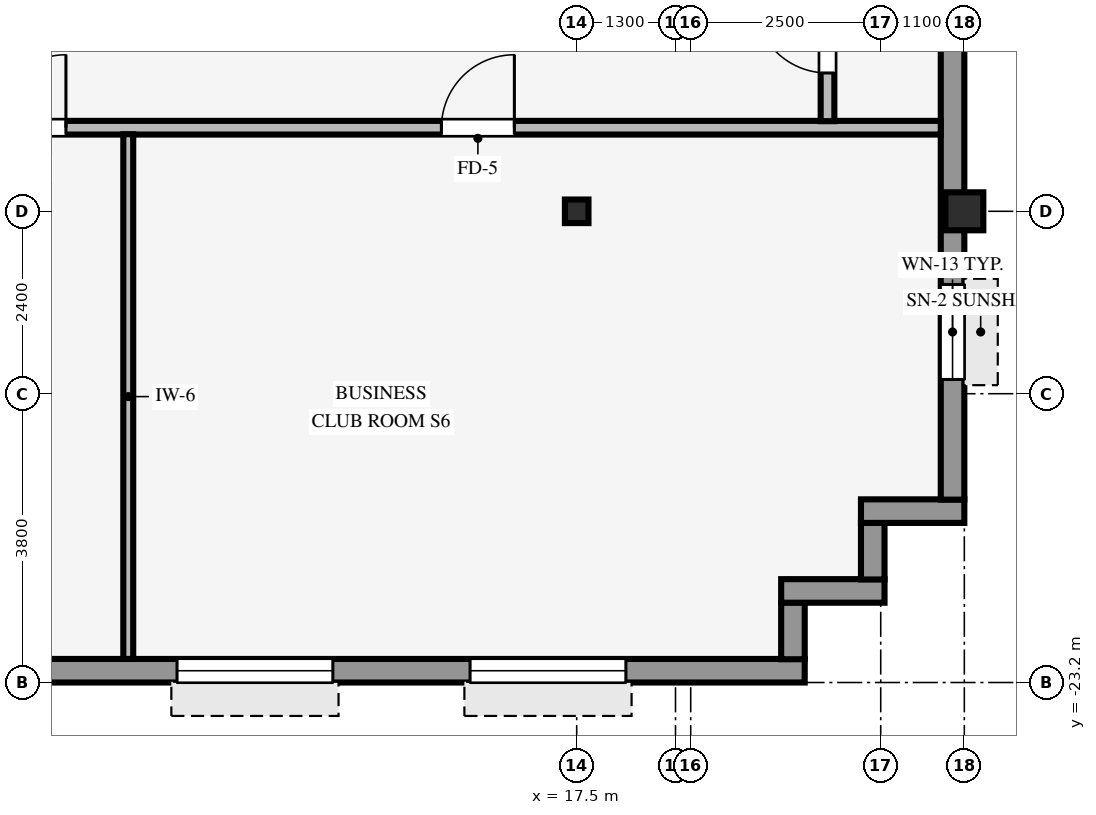
"""IFC4 building model, lengths in metres.
Left out: names, types, materials, properties, quantities, classifications, styles, units other than length and angle.
Written with IfcOpenShell. Run it as: python <this file> out.ifc"""

import sys

from ifc_helpers import new_model, si_unit, direction, frame, frame_2d, origin, origin_2d, place, context, subcontext, project, spatial, rectangle, hollow_rectangle, i_section, extrude, source, transform, mapped, element, fill, save


model = new_model("IFC4")
c1 = context("Model", 3, precision=1e-05, world=origin(), true_north=direction((0.0, 1.0)))
c2 = subcontext(c1, "Body", "Model", "MODEL_VIEW")
j1 = project(units=[si_unit("LENGTHUNIT", "METRE"), si_unit("PLANEANGLEUNIT", "RADIAN")], contexts=[c1])
p1 = place(None, origin())
s1 = spatial("IfcSite", under=j1, at=p1, CompositionType="ELEMENT")
p2 = place(p1, origin())
s2 = spatial("IfcBuilding", under=s1, at=p2, CompositionType="ELEMENT")
p3 = place(p2, frame((0.0, 0.0, 194.55)))
s3 = spatial("IfcBuildingStorey", under=s2, at=p3, CompositionType="ELEMENT", Elevation=194.55)
p4 = place(p3, frame((22.6, -17.0, 0.0), z_axis=(0.0, 0.0, 1.0), x_axis=(1.0, 0.0, 0.0)))
e1 = element("IfcColumn", 1, at=p4, inside=s3, PredefinedType="COLUMN", context=c2, shape_type="SweptSolid", body=[
    extrude(hollow_rectangle(XDim=0.5, YDim=0.5, WallThickness=0.032, InnerFilletRadius=0.032, OuterFilletRadius=0.064, at=origin_2d()), origin(), (0.0, 0.0, 1.0), 3.37),
])
p5 = place(p3, frame((17.5, -17.0, 0.0), z_axis=(0.0, 0.0, 1.0), x_axis=(1.0, 0.0, 0.0)))
e2 = element("IfcColumn", 2, at=p5, inside=s3, PredefinedType="COLUMN", context=c2, shape_type="SweptSolid", body=[
    extrude(i_section(OverallWidth=0.31, OverallDepth=0.31, WebThickness=0.015, FlangeThickness=0.015, FilletRadius=0.015, at=origin_2d()), origin(), (0.0, 0.0, 1.0), 3.37),
])
p6 = place(p3, frame((-24.3, -23.045, 0.0), z_axis=(0.0, 0.0, 1.0), x_axis=(1.0, 0.0, 0.0)))
e3 = element("IfcWall", 3, at=p6, inside=s3, PredefinedType="STANDARD", context=c2, shape_type="SweptSolid", body=[
    extrude(rectangle(XDim=44.8, YDim=0.31, at=frame_2d((22.4, 0.0))), origin(), (0.0, 0.0, 1.0), 2.705),
])
p7 = place(p6, frame((2.353, 0.0, 0.8)))
e4 = element("IfcOpeningElement", 4, at=p7, cuts=e3, PredefinedType="OPENING", context=c2, shape_type="SweptSolid", body=[
    extrude(rectangle(XDim=2.05, YDim=1.52, at=frame_2d((1.025, 0.76))), frame((0.0, 0.165, 0.0), z_axis=(0.0, -1.0, 0.0), x_axis=(1.0, 0.0, 0.0)), (0.0, 0.0, 1.0), 0.33),
])
p8 = place(p6, frame((7.108, 0.0, 0.8)))
e5 = element("IfcOpeningElement", 5, at=p8, cuts=e3, PredefinedType="OPENING", context=c2, shape_type="SweptSolid", body=[
    extrude(rectangle(XDim=2.05, YDim=1.52, at=frame_2d((1.025, 0.76))), frame((0.0, 0.165, 0.0), z_axis=(0.0, -1.0, 0.0), x_axis=(1.0, 0.0, 0.0)), (0.0, 0.0, 1.0), 0.33),
])
p9 = place(p6, frame((16.619, 0.0, 0.8)))
e6 = element("IfcOpeningElement", 6, at=p9, cuts=e3, PredefinedType="OPENING", context=c2, shape_type="SweptSolid", body=[
    extrude(rectangle(XDim=2.05, YDim=1.52, at=frame_2d((1.025, 0.76))), frame((0.0, 0.165, 0.0), z_axis=(0.0, -1.0, 0.0), x_axis=(1.0, 0.0, 0.0)), (0.0, 0.0, 1.0), 0.33),
])
p10 = place(p6, frame((21.375, 0.0, 0.8)))
e7 = element("IfcOpeningElement", 7, at=p10, cuts=e3, PredefinedType="OPENING", context=c2, shape_type="SweptSolid", body=[
    extrude(rectangle(XDim=2.05, YDim=1.52, at=frame_2d((1.025, 0.76))), frame((0.0, 0.165, 0.0), z_axis=(0.0, -1.0, 0.0), x_axis=(1.0, 0.0, 0.0)), (0.0, 0.0, 1.0), 0.33),
])
p11 = place(p6, frame((26.131, 0.0, 0.8)))
e8 = element("IfcOpeningElement", 8, at=p11, cuts=e3, PredefinedType="OPENING", context=c2, shape_type="SweptSolid", body=[
    extrude(rectangle(XDim=2.05, YDim=1.52, at=frame_2d((1.025, 0.76))), frame((0.0, 0.165, 0.0), z_axis=(0.0, -1.0, 0.0), x_axis=(1.0, 0.0, 0.0)), (0.0, 0.0, 1.0), 0.33),
])
p12 = place(p6, frame((30.436, 0.0, 0.8)))
e9 = element("IfcOpeningElement", 9, at=p12, cuts=e3, PredefinedType="OPENING", context=c2, shape_type="SweptSolid", body=[
    extrude(rectangle(XDim=2.05, YDim=1.52, at=frame_2d((1.025, 0.76))), frame((0.0, 0.165, 0.0), z_axis=(0.0, -1.0, 0.0), x_axis=(1.0, 0.0, 0.0)), (0.0, 0.0, 1.0), 0.33),
])
p13 = place(p6, frame((36.542, 0.0, 0.8)))
e10 = element("IfcOpeningElement", 10, at=p13, cuts=e3, PredefinedType="OPENING", context=c2, shape_type="SweptSolid", body=[
    extrude(rectangle(XDim=2.05, YDim=1.52, at=frame_2d((1.025, 0.76))), frame((0.0, 0.165, 0.0), z_axis=(0.0, -1.0, 0.0), x_axis=(1.0, 0.0, 0.0)), (0.0, 0.0, 1.0), 0.33),
])
p14 = place(p6, frame((40.397, 0.0, 0.8)))
e11 = element("IfcOpeningElement", 11, at=p14, cuts=e3, PredefinedType="OPENING", context=c2, shape_type="SweptSolid", body=[
    extrude(rectangle(XDim=2.05, YDim=1.52, at=frame_2d((1.025, 0.76))), frame((0.0, 0.165, 0.0), z_axis=(0.0, -1.0, 0.0), x_axis=(1.0, 0.0, 0.0)), (0.0, 0.0, 1.0), 0.33),
])
p15 = place(p3, frame((20.345, -22.894, 0.0), z_axis=(0.0, 0.0, 1.0), x_axis=(0.0, 1.0, 0.0)))
e12 = element("IfcWall", 12, at=p15, inside=s3, PredefinedType="STANDARD", context=c2, shape_type="SweptSolid", body=[
    extrude(rectangle(XDim=0.748, YDim=0.31, at=frame_2d((0.374, 0.0))), origin(), (0.0, 0.0, 1.0), 3.36),
])
p16 = place(p3, frame((20.19, -21.995, 0.0), z_axis=(0.0, 0.0, 1.0), x_axis=(1.0, 0.0, 0.0)))
e13 = element("IfcWall", 13, at=p16, inside=s3, PredefinedType="STANDARD", context=c2, shape_type="SweptSolid", body=[
    extrude(rectangle(XDim=1.36, YDim=0.31, at=frame_2d((0.68, 0.0))), origin(), (0.0, 0.0, 1.0), 3.36),
])
p17 = place(p3, frame((21.395, -21.844, 0.0), z_axis=(0.0, 0.0, 1.0), x_axis=(0.0, 1.0, 0.0)))
e14 = element("IfcWall", 14, at=p17, inside=s3, PredefinedType="STANDARD", context=c2, shape_type="SweptSolid", body=[
    extrude(rectangle(XDim=0.748, YDim=0.31, at=frame_2d((0.374, 0.0))), origin(), (0.0, 0.0, 1.0), 3.36),
])
p18 = place(p3, frame((21.24, -20.945, 0.0), z_axis=(0.0, 0.0, 1.0), x_axis=(1.0, 0.0, 0.0)))
e15 = element("IfcWall", 15, at=p18, inside=s3, PredefinedType="STANDARD", context=c2, shape_type="SweptSolid", body=[
    extrude(rectangle(XDim=1.36, YDim=0.31, at=frame_2d((0.68, 0.0))), origin(), (0.0, 0.0, 1.0), 3.36),
])
p19 = place(p3, frame((22.445, -20.794, 0.0), z_axis=(0.0, 0.0, 1.0), x_axis=(0.0, 1.0, 0.0)))
e16 = element("IfcWall", 16, at=p19, inside=s3, PredefinedType="STANDARD", context=c2, shape_type="SweptSolid", body=[
    extrude(rectangle(XDim=37.788, YDim=0.31, at=frame_2d((18.894, 0.0))), origin(), (0.0, 0.0, 1.0), 2.705),
])
p20 = place(p19, frame((16.474, 0.0, 0.0), z_axis=(0.0, 0.0, 1.0), x_axis=(-1.0, 0.0, 0.0)))
e17 = element("IfcOpeningElement", 17, at=p20, cuts=e16, PredefinedType="OPENING", context=c2, shape_type="SweptSolid", body=[
    extrude(rectangle(XDim=0.98, YDim=2.15, at=frame_2d((0.49, 1.075))), frame((0.0, 0.165, 0.0), z_axis=(0.0, -1.0, 0.0), x_axis=(1.0, 0.0, 0.0)), (0.0, 0.0, 1.0), 0.33),
])
p21 = place(p19, frame((1.581, 0.0, 0.8)))
e18 = element("IfcOpeningElement", 18, at=p21, cuts=e16, PredefinedType="OPENING", context=c2, shape_type="SweptSolid", body=[
    extrude(rectangle(XDim=1.25, YDim=1.52, at=frame_2d((0.625, 0.76))), frame((0.0, 0.165, 0.0), z_axis=(0.0, -1.0, 0.0), x_axis=(1.0, 0.0, 0.0)), (0.0, 0.0, 1.0), 0.33),
])
p22 = place(p19, frame((8.044, 0.0, 0.8)))
e19 = element("IfcOpeningElement", 19, at=p22, cuts=e16, PredefinedType="OPENING", context=c2, shape_type="SweptSolid", body=[
    extrude(rectangle(XDim=1.25, YDim=1.52, at=frame_2d((0.625, 0.76))), frame((0.0, 0.165, 0.0), z_axis=(0.0, -1.0, 0.0), x_axis=(1.0, 0.0, 0.0)), (0.0, 0.0, 1.0), 0.33),
])
p23 = place(p19, frame((13.156, 0.0, 0.8)))
e20 = element("IfcOpeningElement", 20, at=p23, cuts=e16, PredefinedType="OPENING", context=c2, shape_type="SweptSolid", body=[
    extrude(rectangle(XDim=1.25, YDim=1.52, at=frame_2d((0.625, 0.76))), frame((0.0, 0.165, 0.0), z_axis=(0.0, -1.0, 0.0), x_axis=(1.0, 0.0, 0.0)), (0.0, 0.0, 1.0), 0.33),
])
p24 = place(p19, frame((18.269, 0.0, 0.8)))
e21 = element("IfcOpeningElement", 21, at=p24, cuts=e16, PredefinedType="OPENING", context=c2, shape_type="SweptSolid", body=[
    extrude(rectangle(XDim=1.25, YDim=1.52, at=frame_2d((0.625, 0.76))), frame((0.0, 0.165, 0.0), z_axis=(0.0, -1.0, 0.0), x_axis=(1.0, 0.0, 0.0)), (0.0, 0.0, 1.0), 0.33),
])
p25 = place(p19, frame((22.482, 0.0, 0.8)))
e22 = element("IfcOpeningElement", 22, at=p25, cuts=e16, PredefinedType="OPENING", context=c2, shape_type="SweptSolid", body=[
    extrude(rectangle(XDim=1.25, YDim=1.52, at=frame_2d((0.625, 0.76))), frame((0.0, 0.165, 0.0), z_axis=(0.0, -1.0, 0.0), x_axis=(1.0, 0.0, 0.0)), (0.0, 0.0, 1.0), 0.33),
])
p26 = place(p19, frame((28.044, 0.0, 0.8)))
e23 = element("IfcOpeningElement", 23, at=p26, cuts=e16, PredefinedType="OPENING", context=c2, shape_type="SweptSolid", body=[
    extrude(rectangle(XDim=1.25, YDim=1.52, at=frame_2d((0.625, 0.76))), frame((0.0, 0.165, 0.0), z_axis=(0.0, -1.0, 0.0), x_axis=(1.0, 0.0, 0.0)), (0.0, 0.0, 1.0), 0.33),
])
p27 = place(p19, frame((33.607, 0.0, 0.8)))
e24 = element("IfcOpeningElement", 24, at=p27, cuts=e16, PredefinedType="OPENING", context=c2, shape_type="SweptSolid", body=[
    extrude(rectangle(XDim=1.25, YDim=1.52, at=frame_2d((0.625, 0.76))), frame((0.0, 0.165, 0.0), z_axis=(0.0, -1.0, 0.0), x_axis=(1.0, 0.0, 0.0)), (0.0, 0.0, 1.0), 0.33),
])
p28 = place(p3, frame((-26.09, -15.9, 0.0), z_axis=(0.0, 0.0, 1.0), x_axis=(1.0, 0.0, 0.0)))
e25 = element("IfcWall", 25, at=p28, inside=s3, PredefinedType="PARTITIONING", context=c2, shape_type="SweptSolid", body=[
    extrude(rectangle(XDim=48.38, YDim=0.18, at=frame_2d((24.19, 0.0))), origin(), (0.0, 0.0, 1.0), 3.36),
])
p29 = place(p28, frame((41.81, 0.0, 0.0)))
e26 = element("IfcOpeningElement", 26, at=p29, cuts=e25, PredefinedType="OPENING", context=c2, shape_type="SweptSolid", body=[
    extrude(rectangle(XDim=0.96, YDim=2.1, at=frame_2d((0.48, 1.05))), frame((0.0, 0.1, 0.0), z_axis=(0.0, -1.0, 0.0), x_axis=(1.0, 0.0, 0.0)), (0.0, 0.0, 1.0), 0.2),
])
p30 = place(p28, frame((17.985, 0.0, 0.0)))
e27 = element("IfcOpeningElement", 27, at=p30, cuts=e25, PredefinedType="OPENING", context=c2, shape_type="SweptSolid", body=[
    extrude(rectangle(XDim=0.96, YDim=2.1, at=frame_2d((0.48, 1.05))), frame((0.0, 0.1, 0.0), z_axis=(0.0, -1.0, 0.0), x_axis=(1.0, 0.0, 0.0)), (0.0, 0.0, 1.0), 0.2),
])
p31 = place(p28, frame((26.55, 0.0, 0.0)))
e28 = element("IfcOpeningElement", 28, at=p31, cuts=e25, PredefinedType="OPENING", context=c2, shape_type="SweptSolid", body=[
    extrude(rectangle(XDim=0.96, YDim=2.1, at=frame_2d((0.48, 1.05))), frame((0.0, 0.1, 0.0), z_axis=(0.0, -1.0, 0.0), x_axis=(1.0, 0.0, 0.0)), (0.0, 0.0, 1.0), 0.2),
])
p32 = place(p28, frame((10.935, 0.0, 0.0)))
e29 = element("IfcOpeningElement", 29, at=p32, cuts=e25, PredefinedType="OPENING", context=c2, shape_type="SweptSolid", body=[
    extrude(rectangle(XDim=0.96, YDim=2.1, at=frame_2d((0.48, 1.05))), frame((0.0, 0.1, 0.0), z_axis=(0.0, -1.0, 0.0), x_axis=(1.0, 0.0, 0.0)), (0.0, 0.0, 1.0), 0.2),
])
p33 = place(p28, frame((35.91, 0.0, 0.0)))
e30 = element("IfcOpeningElement", 30, at=p33, cuts=e25, PredefinedType="OPENING", context=c2, shape_type="SweptSolid", body=[
    extrude(rectangle(XDim=0.96, YDim=2.1, at=frame_2d((0.48, 1.05))), frame((0.0, 0.1, 0.0), z_axis=(0.0, -1.0, 0.0), x_axis=(1.0, 0.0, 0.0)), (0.0, 0.0, 1.0), 0.2),
])
p34 = place(p28, frame((2.465, 0.0, 0.0)))
e31 = element("IfcOpeningElement", 31, at=p34, cuts=e25, PredefinedType="OPENING", context=c2, shape_type="SweptSolid", body=[
    extrude(rectangle(XDim=0.96, YDim=2.1, at=frame_2d((0.48, 1.05))), frame((0.0, 0.1, 0.0), z_axis=(0.0, -1.0, 0.0), x_axis=(1.0, 0.0, 0.0)), (0.0, 0.0, 1.0), 0.2),
])
p35 = place(p3, frame((11.6, -22.89, 0.0), z_axis=(0.0, 0.0, 1.0), x_axis=(0.0, 1.0, 0.0)))
e32 = element("IfcWall", 32, at=p35, inside=s3, PredefinedType="PARTITIONING", context=c2, shape_type="SweptSolid", body=[
    extrude(rectangle(XDim=6.904, YDim=0.13, at=frame_2d((3.452, 0.0))), origin(), (0.0, 0.0, 1.0), 3.36),
])
p36 = place(p3, frame((20.8, -15.814, 0.0), z_axis=(0.0, 0.0, 1.0), x_axis=(0.0, 1.0, 0.0)))
e33 = element("IfcWall", 33, at=p36, inside=s3, PredefinedType="PARTITIONING", context=c2, shape_type="SweptSolid", body=[
    extrude(rectangle(XDim=2.228, YDim=0.18, at=frame_2d((1.114, 0.0))), origin(), (0.0, 0.0, 1.0), 3.36),
])
p37 = place(p36, frame((0.634, 0.0, 0.0)))
e34 = element("IfcOpeningElement", 34, at=p37, cuts=e33, PredefinedType="OPENING", context=c2, shape_type="SweptSolid", body=[
    extrude(rectangle(XDim=0.96, YDim=2.1, at=frame_2d((0.48, 1.05))), frame((0.0, 0.1, 0.0), z_axis=(0.0, -1.0, 0.0), x_axis=(1.0, 0.0, 0.0)), (0.0, 0.0, 1.0), 0.2),
])
m1 = source(origin(), c2, "Body", "SweptSolid", [
    extrude(rectangle(XDim=2.05, YDim=1.52, at=frame_2d((1.025, 0.76))), frame((0.0, 0.03, 0.0), z_axis=(0.0, -1.0, 0.0), x_axis=(1.0, 0.0, 0.0)), (0.0, 0.0, 1.0), 0.06),
])
p38 = place(p13, origin())
e35 = element("IfcWindow", 35, at=p38, inside=s3, PartitioningType="SINGLE_PANEL", PredefinedType="WINDOW", context=c2, shape_type="MappedRepresentation", body=[
    mapped(m1, transform((0.0, 0.0, 0.0), scale=1.0)),
])
fill(e10, e35)
p39 = place(p14, origin())
e36 = element("IfcWindow", 36, at=p39, inside=s3, PartitioningType="SINGLE_PANEL", PredefinedType="WINDOW", context=c2, shape_type="MappedRepresentation", body=[
    mapped(m1, transform((0.0, 0.0, 0.0), scale=1.0)),
])
fill(e11, e36)
m2 = source(origin(), c2, "Body", "SweptSolid", [
    extrude(rectangle(XDim=1.25, YDim=1.52, at=frame_2d((0.625, 0.76))), frame((0.0, 0.03, 0.0), z_axis=(0.0, -1.0, 0.0), x_axis=(1.0, 0.0, 0.0)), (0.0, 0.0, 1.0), 0.06),
])
p40 = place(p21, origin())
e37 = element("IfcWindow", 37, at=p40, inside=s3, PartitioningType="SINGLE_PANEL", PredefinedType="WINDOW", context=c2, shape_type="MappedRepresentation", body=[
    mapped(m2, transform((0.0, 0.0, 0.0), scale=1.0)),
])
fill(e18, e37)
m3 = source(origin(), c2, "Body", "SweptSolid", [
    extrude(rectangle(XDim=0.96, YDim=2.1, at=frame_2d((0.48, 1.05))), frame((0.0, 0.025, 0.0), z_axis=(0.0, -1.0, 0.0), x_axis=(1.0, 0.0, 0.0)), (0.0, 0.0, 1.0), 0.05),
])
p41 = place(p29, origin())
e38 = element("IfcDoor", 38, at=p41, inside=s3, OperationType="SINGLE_SWING_RIGHT", PredefinedType="DOOR", context=c2, shape_type="MappedRepresentation", body=[
    mapped(m3, transform((0.0, 0.0, 0.0), scale=1.0)),
])
fill(e26, e38)
p42 = place(p33, origin())
e39 = element("IfcDoor", 39, at=p42, inside=s3, OperationType="SINGLE_SWING_RIGHT", PredefinedType="DOOR", context=c2, shape_type="MappedRepresentation", body=[
    mapped(m3, transform((0.0, 0.0, 0.0), scale=1.0)),
])
fill(e30, e39)
p43 = place(p37, origin())
e40 = element("IfcDoor", 40, at=p43, inside=s3, OperationType="SINGLE_SWING_RIGHT", PredefinedType="DOOR", context=c2, shape_type="MappedRepresentation", body=[
    mapped(m3, transform((0.0, 0.0, 0.0), scale=1.0)),
])
fill(e34, e40)
save(model, sys.argv[1])
